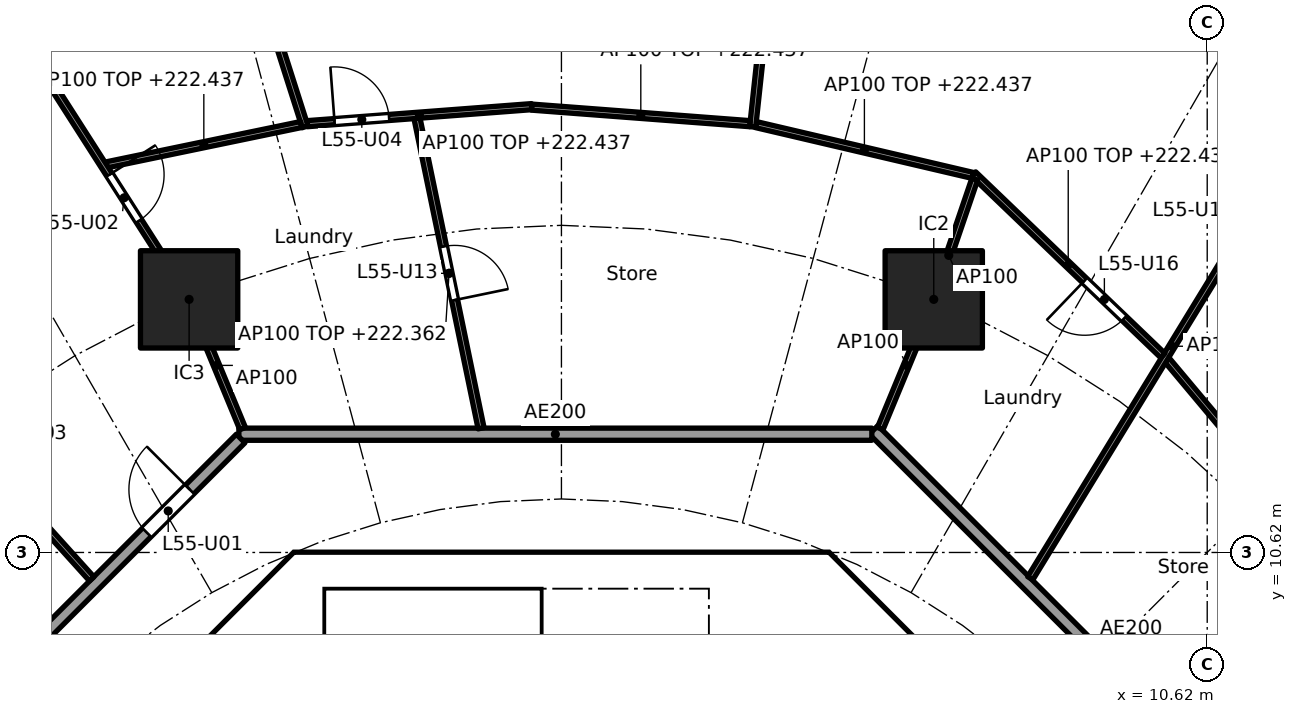
"""IFC4 building model, lengths in metres.
Left out: names, types, materials, properties, quantities, classifications, styles, units other than length and angle.
Written with IfcOpenShell. Run it as: python <this file> out.ifc"""

import sys

from ifc_helpers import new_model, si_unit, direction, frame, frame_2d, origin, origin_2d, place, context, subcontext, project, spatial, polyline, rectangle, outline, extrude, element, fill, save


model = new_model("IFC4")
c1 = context("Model", 3, precision=1e-05, world=origin(), true_north=direction((0.0, 1.0)))
c2 = subcontext(c1, "Body", "Model", "MODEL_VIEW")
j1 = project(units=[si_unit("LENGTHUNIT", "METRE"), si_unit("PLANEANGLEUNIT", "RADIAN")], contexts=[c1])
p1 = place(None, origin())
s1 = spatial("IfcSite", under=j1, at=p1, CompositionType="ELEMENT")
p2 = place(p1, origin())
s2 = spatial("IfcBuilding", under=s1, at=p2, CompositionType="ELEMENT")
p3 = place(p2, frame((0.0, 0.0, 219.6)))
s3 = spatial("IfcBuildingStorey", under=s2, at=p3, CompositionType="ELEMENT", Elevation=219.6)
for number, where, z_axis, x_axis in (
    (1, (6.123, 14.782, 0.0), (0.0, 0.0, 1.0), (1.0, 0.0, 0.0)),
    (2, (-6.123, 14.782, 0.0), (0.0, 0.0, 1.0), (1.0, 0.0, 0.0)),
):
    element("IfcColumn", number, at=place(p3, frame(where, z_axis=z_axis, x_axis=x_axis)), inside=s3, PredefinedType="COLUMN", context=c2, shape_type="SweptSolid", body=[
        extrude(rectangle(XDim=1.6, YDim=1.6, at=origin_2d()), origin(), (0.0, 0.0, 1.0), 3.7),
    ])
p4 = place(p3, frame((9.988, 4.613, 0.0), z_axis=(0.0, 0.0, 1.0), x_axis=(-0.707106781187, 0.707106781187, 0.0)))
e3 = element("IfcWall", 3, at=p4, inside=s3, PredefinedType="SHEAR", context=c2, shape_type="SweptSolid", body=[
    extrude(rectangle(XDim=7.602, YDim=0.6, at=frame_2d((3.801, 0.0))), origin(), (0.0, 0.0, 1.0), 3.44),
])
p5 = place(p4, frame((3.201, 0.0, 0.0)))
e4 = element("IfcOpeningElement", 4, at=p5, cuts=e3, PredefinedType="OPENING", context=c2, shape_type="SweptSolid", body=[
    extrude(rectangle(XDim=1.2, YDim=2.1, at=frame_2d((0.6, 1.05))), frame((0.0, 0.31, 0.0), z_axis=(0.0, -1.0, 0.0), x_axis=(1.0, 0.0, 0.0)), (0.0, 0.0, 1.0), 0.62),
])
p6 = place(p3, frame((-4.613, 9.988, 0.0), z_axis=(0.0, 0.0, 1.0), x_axis=(-0.707106781187, -0.707106781187, 0.0)))
e5 = element("IfcWall", 5, at=p6, inside=s3, PredefinedType="SHEAR", context=c2, shape_type="SweptSolid", body=[
    extrude(rectangle(XDim=7.602, YDim=0.6, at=frame_2d((3.801, 0.0))), origin(), (0.0, 0.0, 1.0), 3.44),
])
p7 = place(p6, frame((0.351, 0.0, 0.0)))
e6 = element("IfcOpeningElement", 6, at=p7, cuts=e5, PredefinedType="OPENING", context=c2, shape_type="SweptSolid", body=[
    extrude(rectangle(XDim=1.1, YDim=2.1, at=frame_2d((0.55, 1.05))), frame((0.0, 0.31, 0.0), z_axis=(0.0, -1.0, 0.0), x_axis=(1.0, 0.0, 0.0)), (0.0, 0.0, 1.0), 0.62),
])
p8 = place(p3, frame((4.0, 7.025, 0.0), z_axis=(0.0, 0.0, 1.0), x_axis=(0.0, 1.0, 0.0)))
e7 = element("IfcWall", 7, at=p8, inside=s3, PredefinedType="SOLIDWALL", context=c2, shape_type="SweptSolid", body=[
    extrude(rectangle(XDim=3.0, YDim=0.2, at=frame_2d((1.5, 0.0))), origin(), (0.0, 0.0, 1.0), 3.44),
])
p9 = place(p8, frame((0.925, 0.0, 0.0)))
e8 = element("IfcOpeningElement", 8, at=p9, cuts=e7, PredefinedType="OPENING", context=c2, shape_type="SweptSolid", body=[
    extrude(rectangle(XDim=1.1, YDim=2.1, at=frame_2d((0.55, 1.05))), frame((0.0, 0.11, 0.0), z_axis=(0.0, -1.0, 0.0), x_axis=(1.0, 0.0, 0.0)), (0.0, 0.0, 1.0), 0.22),
])
p10 = place(p3, origin())
e9 = element("IfcWall", 9, at=p10, inside=s3, PredefinedType="SHEAR", context=c2, shape_type="SweptSolid", body=[
    extrude(outline(polyline([(-4.152, 10.025), (-4.401, 9.776), (-4.825, 10.2), (-4.401, 10.625), (4.401, 10.625), (4.825, 10.2), (4.401, 9.776), (4.152, 10.025), (-4.152, 10.025)])), origin(), (0.0, 0.0, 1.0), 3.44),
])
p11 = place(p3, origin())
e10 = element("IfcWall", 10, at=p11, inside=s3, PredefinedType="SOLIDWALL", context=c2, shape_type="SweptSolid", body=[
    extrude(outline(polyline([(-3.9, 7.025), (-4.1, 7.025), (-4.1, 10.025), (-3.9, 10.025), (-3.9, 7.025)])), origin(), (0.0, 0.0, 1.0), 3.44),
])
p12 = place(p3, frame((12.635, 5.134, 0.0), z_axis=(0.0, 0.0, 1.0), x_axis=(-0.707106781187, 0.707106781187, 0.0)))
e11 = element("IfcWall", 11, at=p12, inside=s3, PredefinedType="PARTITIONING", context=c2, shape_type="SweptSolid", body=[
    extrude(rectangle(XDim=10.609, YDim=0.2, at=frame_2d((5.305, 0.0))), origin(), (0.0, 0.0, 1.0), 3.44),
])
p13 = place(p3, frame((5.104, 12.565, 0.0), z_axis=(0.0, 0.0, 1.0), x_axis=(-1.0, 0.0, 0.0)))
e12 = element("IfcWall", 12, at=p13, inside=s3, PredefinedType="PARTITIONING", context=c2, shape_type="SweptSolid", body=[
    extrude(rectangle(XDim=10.409, YDim=0.2, at=frame_2d((5.205, 0.0))), origin(), (0.0, 0.0, 1.0), 3.44),
])
p14 = place(p3, frame((-5.275, 12.494, 0.0), z_axis=(0.0, 0.0, 1.0), x_axis=(-0.707106781187, -0.707106781187, 0.0)))
e13 = element("IfcWall", 13, at=p14, inside=s3, PredefinedType="PARTITIONING", context=c2, shape_type="SweptSolid", body=[
    extrude(rectangle(XDim=10.209, YDim=0.2, at=frame_2d((5.104, 0.0))), origin(), (0.0, 0.0, 1.0), 3.44),
])
p15 = place(p14, frame((1.185, 0.0, 0.0)))
e14 = element("IfcOpeningElement", 14, at=p15, cuts=e13, PredefinedType="OPENING", context=c2, shape_type="SweptSolid", body=[
    extrude(rectangle(XDim=1.0, YDim=2.1, at=frame_2d((0.5, 1.05))), frame((0.0, 0.11, 0.0), z_axis=(0.0, -1.0, 0.0), x_axis=(1.0, 0.0, 0.0)), (0.0, 0.0, 1.0), 0.22),
])
p16 = place(p3, frame((12.759, 10.443, 0.0), z_axis=(0.0, 0.0, 1.0), x_axis=(-0.642225196965, 0.766516011825, 0.0)))
e15 = element("IfcWall", 15, at=p16, inside=s3, PredefinedType="PARTITIONING", context=c2, shape_type="SweptSolid", body=[
    extrude(rectangle(XDim=4.361, YDim=0.1, at=frame_2d((2.18, 0.0))), origin(), (0.0, 0.0, 1.0), 2.837),
])
p17 = place(p3, frame((7.71, 10.197, 0.0), z_axis=(0.0, 0.0, 1.0), x_axis=(0.521477621335, 0.853264959111, 0.0)))
e16 = element("IfcWall", 16, at=p17, inside=s3, PredefinedType="PARTITIONING", context=c2, shape_type="SweptSolid", body=[
    extrude(rectangle(XDim=8.941, YDim=0.1, at=frame_2d((4.471, 0.0))), origin(), (0.0, 0.0, 1.0), 2.762),
])
p18 = place(p17, frame((6.121, 0.0, 0.0)))
e17 = element("IfcOpeningElement", 17, at=p18, cuts=e16, PredefinedType="OPENING", context=c2, shape_type="SweptSolid", body=[
    extrude(rectangle(XDim=0.9, YDim=2.1, at=frame_2d((0.45, 1.05))), frame((0.0, 0.06, 0.0), z_axis=(0.0, -1.0, 0.0), x_axis=(1.0, 0.0, 0.0)), (0.0, 0.0, 1.0), 0.12),
])
p19 = place(p3, frame((9.89, 13.858, 0.0), z_axis=(0.0, 0.0, 1.0), x_axis=(-0.72167233993, 0.692234811159, 0.0)))
e18 = element("IfcWall", 18, at=p19, inside=s3, PredefinedType="PARTITIONING", context=c2, shape_type="SweptSolid", body=[
    extrude(rectangle(XDim=4.313, YDim=0.1, at=frame_2d((2.156, 0.0))), origin(), (0.0, 0.0, 1.0), 2.837),
])
p20 = place(p19, frame((0.883, 0.0, 0.0)))
e19 = element("IfcOpeningElement", 19, at=p20, cuts=e18, PredefinedType="OPENING", context=c2, shape_type="SweptSolid", body=[
    extrude(rectangle(XDim=0.9, YDim=2.1, at=frame_2d((0.45, 1.05))), frame((0.0, 0.06, 0.0), z_axis=(0.0, -1.0, 0.0), x_axis=(1.0, 0.0, 0.0)), (0.0, 0.0, 1.0), 0.12),
])
p21 = place(p3, frame((12.31, 17.817, 0.0), z_axis=(0.0, 0.0, 1.0), x_axis=(-0.739697052892, 0.672940019573, 0.0)))
e20 = element("IfcWall", 20, at=p21, inside=s3, PredefinedType="PARTITIONING", context=c2, shape_type="SweptSolid", body=[
    extrude(rectangle(XDim=5.365, YDim=0.1, at=frame_2d((2.683, 0.0))), origin(), (0.0, 0.0, 1.0), 2.837),
])
p22 = place(p21, frame((2.208, 0.0, 0.0)))
e21 = element("IfcOpeningElement", 21, at=p22, cuts=e20, PredefinedType="OPENING", context=c2, shape_type="SweptSolid", body=[
    extrude(rectangle(XDim=0.9, YDim=2.1, at=frame_2d((0.45, 1.05))), frame((0.0, 0.06, 0.0), z_axis=(0.0, -1.0, 0.0), x_axis=(1.0, 0.0, 0.0)), (0.0, 0.0, 1.0), 0.12),
])
p23 = place(p3, frame((5.243, 12.657, 0.0), z_axis=(0.0, 0.0, 1.0), x_axis=(0.382719158442, 0.923864733477, 0.0)))
e22 = element("IfcWall", 22, at=p23, inside=s3, PredefinedType="PARTITIONING", context=c2, shape_type="SweptSolid", body=[
    extrude(rectangle(XDim=2.25, YDim=0.1, at=frame_2d((1.125, 0.0))), origin(), (0.0, 0.0, 1.0), 3.44),
])
p24 = place(p3, frame((6.139, 14.829, 0.0), z_axis=(0.0, 0.0, 1.0), x_axis=(0.32278593828, 0.946471995385, 0.0)))
e23 = element("IfcWall", 23, at=p24, inside=s3, PredefinedType="PARTITIONING", context=c2, shape_type="SweptSolid", body=[
    extrude(rectangle(XDim=2.042, YDim=0.1, at=frame_2d((1.021, 0.0))), origin(), (0.0, 0.0, 1.0), 3.44),
])
p25 = place(p3, frame((6.766, 16.82, 0.0), z_axis=(0.0, 0.0, 1.0), x_axis=(-0.973612608559, 0.22820711745, 0.0)))
e24 = element("IfcWall", 24, at=p25, inside=s3, PredefinedType="PARTITIONING", context=c2, shape_type="SweptSolid", body=[
    extrude(rectangle(XDim=3.663, YDim=0.1, at=frame_2d((1.832, 0.0))), origin(), (0.0, 0.0, 1.0), 2.837),
])
p26 = place(p3, frame((3.145, 17.618, 0.0), z_axis=(0.0, 0.0, 1.0), x_axis=(0.106820754108, 0.994278294288, 0.0)))
e25 = element("IfcWall", 25, at=p26, inside=s3, PredefinedType="PARTITIONING", context=c2, shape_type="SweptSolid", body=[
    extrude(rectangle(XDim=5.574, YDim=0.1, at=frame_2d((2.787, 0.0))), origin(), (0.0, 0.0, 1.0), 3.44),
])
p27 = place(p26, frame((2.337, 0.0, 0.0)))
e26 = element("IfcOpeningElement", 26, at=p27, cuts=e25, PredefinedType="OPENING", context=c2, shape_type="SweptSolid", body=[
    extrude(rectangle(XDim=0.9, YDim=2.1, at=frame_2d((0.45, 1.05))), frame((0.0, 0.06, 0.0), z_axis=(0.0, -1.0, 0.0), x_axis=(1.0, 0.0, 0.0)), (0.0, 0.0, 1.0), 0.12),
])
p28 = place(p3, frame((3.101, 17.671, 0.0), z_axis=(0.0, 0.0, 1.0), x_axis=(-0.997133705575, 0.075659587668, 0.0)))
e27 = element("IfcWall", 27, at=p28, inside=s3, PredefinedType="PARTITIONING", context=c2, shape_type="SweptSolid", body=[
    extrude(rectangle(XDim=3.601, YDim=0.1, at=frame_2d((1.801, 0.0))), origin(), (0.0, 0.0, 1.0), 2.837),
])
p29 = place(p3, frame((-0.49, 17.951, 0.0), z_axis=(0.0, 0.0, 1.0), x_axis=(-0.997133495787, -0.075662352452, 0.0)))
e28 = element("IfcWall", 28, at=p29, inside=s3, PredefinedType="PARTITIONING", context=c2, shape_type="SweptSolid", body=[
    extrude(rectangle(XDim=3.701, YDim=0.1, at=frame_2d((1.851, 0.0))), origin(), (0.0, 0.0, 1.0), 2.837),
])
p30 = place(p29, frame((2.351, 0.0, 0.0)))
e29 = element("IfcOpeningElement", 29, at=p30, cuts=e28, PredefinedType="OPENING", context=c2, shape_type="SweptSolid", body=[
    extrude(rectangle(XDim=0.9, YDim=2.1, at=frame_2d((0.45, 1.05))), frame((0.0, 0.06, 0.0), z_axis=(0.0, -1.0, 0.0), x_axis=(1.0, 0.0, 0.0)), (0.0, 0.0, 1.0), 0.12),
])
p31 = place(p3, frame((-1.321, 12.663, 0.0), z_axis=(0.0, 0.0, 1.0), x_axis=(-0.202526486639, 0.979276785291, 0.0)))
e30 = element("IfcWall", 30, at=p31, inside=s3, PredefinedType="PARTITIONING", context=c2, shape_type="SweptSolid", body=[
    extrude(rectangle(XDim=5.204, YDim=0.1, at=frame_2d((2.602, 0.0))), origin(), (0.0, 0.0, 1.0), 2.762),
])
p32 = place(p31, frame((2.152, 0.0, 0.0)))
e31 = element("IfcOpeningElement", 31, at=p32, cuts=e30, PredefinedType="OPENING", context=c2, shape_type="SweptSolid", body=[
    extrude(rectangle(XDim=0.9, YDim=2.1, at=frame_2d((0.45, 1.05))), frame((0.0, 0.06, 0.0), z_axis=(0.0, -1.0, 0.0), x_axis=(1.0, 0.0, 0.0)), (0.0, 0.0, 1.0), 0.12),
])
p33 = place(p3, frame((-4.215, 17.62, 0.0), z_axis=(0.0, 0.0, 1.0), x_axis=(-0.303985237897, 0.952676742206, 0.0)))
e32 = element("IfcWall", 32, at=p33, inside=s3, PredefinedType="PARTITIONING", context=c2, shape_type="SweptSolid", body=[
    extrude(rectangle(XDim=11.499, YDim=0.1, at=frame_2d((5.75, 0.0))), origin(), (0.0, 0.0, 1.0), 2.837),
])
p34 = place(p33, frame((2.457, 0.0, 0.0)))
e33 = element("IfcOpeningElement", 33, at=p34, cuts=e32, PredefinedType="OPENING", context=c2, shape_type="SweptSolid", body=[
    extrude(rectangle(XDim=0.9, YDim=2.1, at=frame_2d((0.45, 1.05))), frame((0.0, 0.06, 0.0), z_axis=(0.0, -1.0, 0.0), x_axis=(1.0, 0.0, 0.0)), (0.0, 0.0, 1.0), 0.12),
])
p35 = place(p33, frame((8.181, 0.0, 0.0)))
e34 = element("IfcOpeningElement", 34, at=p35, cuts=e32, PredefinedType="OPENING", context=c2, shape_type="SweptSolid", body=[
    extrude(rectangle(XDim=0.9, YDim=2.1, at=frame_2d((0.45, 1.05))), frame((0.0, 0.06, 0.0), z_axis=(0.0, -1.0, 0.0), x_axis=(1.0, 0.0, 0.0)), (0.0, 0.0, 1.0), 0.12),
])
p36 = place(p3, frame((-4.28, 17.657, 0.0), z_axis=(0.0, 0.0, 1.0), x_axis=(-0.979205232861, -0.202872156637, 0.0)))
e35 = element("IfcWall", 35, at=p36, inside=s3, PredefinedType="PARTITIONING", context=c2, shape_type="SweptSolid", body=[
    extrude(rectangle(XDim=3.271, YDim=0.1, at=frame_2d((1.635, 0.0))), origin(), (0.0, 0.0, 1.0), 2.837),
])
p37 = place(p3, frame((-5.243, 12.657, 0.0), z_axis=(0.0, 0.0, 1.0), x_axis=(-0.382757529444, 0.923848837015, 0.0)))
e36 = element("IfcWall", 36, at=p37, inside=s3, PredefinedType="PARTITIONING", context=c2, shape_type="SweptSolid", body=[
    extrude(rectangle(XDim=2.25, YDim=0.1, at=frame_2d((1.125, 0.0))), origin(), (0.0, 0.0, 1.0), 3.44),
])
p38 = place(p3, frame((-6.15, 14.824, 0.0), z_axis=(0.0, 0.0, 1.0), x_axis=(-0.538870687577, 0.842388498301, 0.0)))
e37 = element("IfcWall", 37, at=p38, inside=s3, PredefinedType="PARTITIONING", context=c2, shape_type="SweptSolid", body=[
    extrude(rectangle(XDim=13.213, YDim=0.1, at=frame_2d((6.606, 0.0))), origin(), (0.0, 0.0, 1.0), 2.837),
])
p39 = place(p38, frame((1.483, 0.0, 0.0)))
e38 = element("IfcOpeningElement", 38, at=p39, cuts=e37, PredefinedType="OPENING", context=c2, shape_type="SweptSolid", body=[
    extrude(rectangle(XDim=0.9, YDim=2.1, at=frame_2d((0.45, 1.05))), frame((0.0, 0.06, 0.0), z_axis=(0.0, -1.0, 0.0), x_axis=(1.0, 0.0, 0.0)), (0.0, 0.0, 1.0), 0.12),
])
p40 = place(p3, frame((-7.725, 10.186, 0.0), z_axis=(0.0, 0.0, 1.0), x_axis=(-0.669819599194, 0.742523874725, 0.0)))
e39 = element("IfcWall", 39, at=p40, inside=s3, PredefinedType="PARTITIONING", context=c2, shape_type="SweptSolid", body=[
    extrude(rectangle(XDim=10.282, YDim=0.1, at=frame_2d((5.141, 0.0))), origin(), (0.0, 0.0, 1.0), 2.762),
])
p41 = place(p40, frame((2.0, 0.0, 0.0)))
e40 = element("IfcOpeningElement", 40, at=p41, cuts=e39, PredefinedType="OPENING", context=c2, shape_type="SweptSolid", body=[
    extrude(rectangle(XDim=0.9, YDim=2.1, at=frame_2d((0.45, 1.05))), frame((0.0, 0.06, 0.0), z_axis=(0.0, -1.0, 0.0), x_axis=(1.0, 0.0, 0.0)), (0.0, 0.0, 1.0), 0.12),
])
p42 = place(p40, frame((7.116, 0.0, 0.0)))
e41 = element("IfcOpeningElement", 41, at=p42, cuts=e39, PredefinedType="OPENING", context=c2, shape_type="SweptSolid", body=[
    extrude(rectangle(XDim=0.9, YDim=2.1, at=frame_2d((0.45, 1.05))), frame((0.0, 0.06, 0.0), z_axis=(0.0, -1.0, 0.0), x_axis=(1.0, 0.0, 0.0)), (0.0, 0.0, 1.0), 0.12),
])
p43 = place(p7, origin())
e42 = element("IfcDoor", 42, at=p43, inside=s3, OperationType="SINGLE_SWING_RIGHT", PredefinedType="DOOR", context=c2, shape_type="SweptSolid", body=[
    extrude(rectangle(XDim=1.1, YDim=2.1, at=frame_2d((0.55, 1.05))), frame((0.0, 0.025, 0.0), z_axis=(0.0, -1.0, 0.0), x_axis=(1.0, 0.0, 0.0)), (0.0, 0.0, 1.0), 0.05),
])
fill(e6, e42)
p44 = place(p15, frame((1.0, 0.0, 0.0), x_axis=(-1.0, 0.0, 0.0)))
e43 = element("IfcDoor", 43, at=p44, inside=s3, OperationType="SINGLE_SWING_RIGHT", PredefinedType="DOOR", context=c2, shape_type="SweptSolid", body=[
    extrude(rectangle(XDim=1.0, YDim=2.1, at=frame_2d((0.5, 1.05))), frame((0.0, 0.025, 0.0), z_axis=(0.0, -1.0, 0.0), x_axis=(1.0, 0.0, 0.0)), (0.0, 0.0, 1.0), 0.05),
])
fill(e14, e43)
p45 = place(p39, frame((0.9, 0.0, 0.0), x_axis=(-1.0, 0.0, 0.0)))
e44 = element("IfcDoor", 44, at=p45, inside=s3, OperationType="SINGLE_SWING_LEFT", PredefinedType="DOOR", context=c2, shape_type="SweptSolid", body=[
    extrude(rectangle(XDim=0.9, YDim=2.1, at=frame_2d((0.45, 1.05))), frame((0.0, 0.025, 0.0), z_axis=(0.0, -1.0, 0.0), x_axis=(1.0, 0.0, 0.0)), (0.0, 0.0, 1.0), 0.05),
])
fill(e38, e44)
p46 = place(p30, frame((0.9, 0.0, 0.0), x_axis=(-1.0, 0.0, 0.0)))
e45 = element("IfcDoor", 45, at=p46, inside=s3, OperationType="SINGLE_SWING_LEFT", PredefinedType="DOOR", context=c2, shape_type="SweptSolid", body=[
    extrude(rectangle(XDim=0.9, YDim=2.1, at=frame_2d((0.45, 1.05))), frame((0.0, 0.025, 0.0), z_axis=(0.0, -1.0, 0.0), x_axis=(1.0, 0.0, 0.0)), (0.0, 0.0, 1.0), 0.05),
])
fill(e29, e45)
p47 = place(p32, frame((0.9, 0.0, 0.0), x_axis=(-1.0, 0.0, 0.0)))
e46 = element("IfcDoor", 46, at=p47, inside=s3, OperationType="SINGLE_SWING_RIGHT", PredefinedType="DOOR", context=c2, shape_type="SweptSolid", body=[
    extrude(rectangle(XDim=0.9, YDim=2.1, at=frame_2d((0.45, 1.05))), frame((0.0, 0.025, 0.0), z_axis=(0.0, -1.0, 0.0), x_axis=(1.0, 0.0, 0.0)), (0.0, 0.0, 1.0), 0.05),
])
fill(e31, e46)
p48 = place(p20, origin())
e47 = element("IfcDoor", 47, at=p48, inside=s3, OperationType="SINGLE_SWING_RIGHT", PredefinedType="DOOR", context=c2, shape_type="SweptSolid", body=[
    extrude(rectangle(XDim=0.9, YDim=2.1, at=frame_2d((0.45, 1.05))), frame((0.0, 0.025, 0.0), z_axis=(0.0, -1.0, 0.0), x_axis=(1.0, 0.0, 0.0)), (0.0, 0.0, 1.0), 0.05),
])
fill(e19, e47)
save(model, sys.argv[1])
